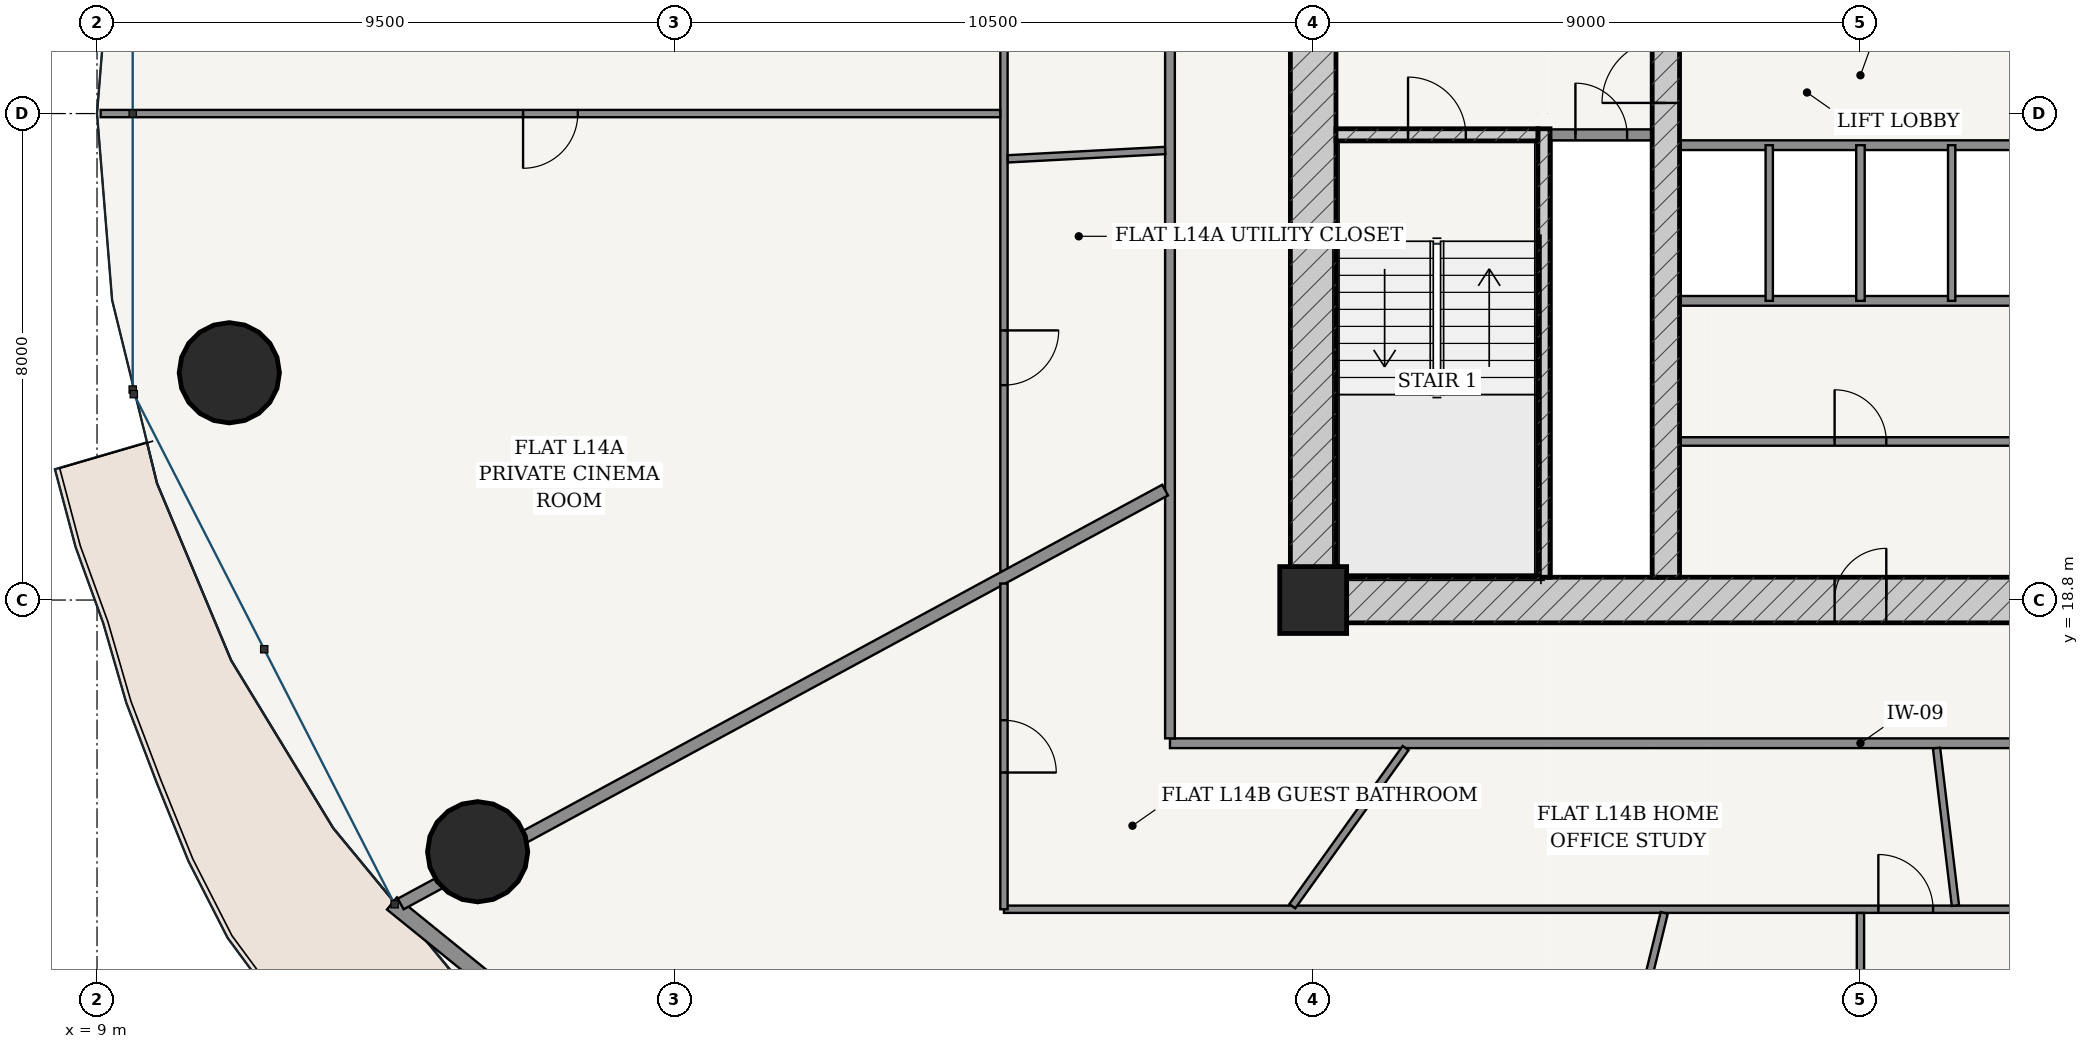
"""IFC4 building model, lengths in metres.
Left out: names, types, materials, properties, quantities, classifications, styles, units other than length and angle.
Written with IfcOpenShell. Run it as: python <this file> out.ifc"""

import sys

from ifc_helpers import new_model, si_unit, direction, frame, frame_2d, origin, origin_2d, place, context, subcontext, project, spatial, rectangle, hollow_circle, extrude, source, transform, mapped, element, fill, save


model = new_model("IFC4")
c1 = context("Model", 3, precision=1e-05, world=origin(), true_north=direction((-0.2419218956, 0.970295726276)))
c2 = subcontext(c1, "Body", "Model", "MODEL_VIEW")
j1 = project(units=[si_unit("LENGTHUNIT", "METRE"), si_unit("PLANEANGLEUNIT", "RADIAN")], contexts=[c1])
p1 = place(None, origin())
s1 = spatial("IfcSite", under=j1, at=p1, CompositionType="ELEMENT")
p2 = place(p1, origin())
s2 = spatial("IfcBuilding", under=s1, at=p2, CompositionType="ELEMENT")
p3 = place(p2, frame((0.0, 0.0, 56.4)))
s3 = spatial("IfcBuildingStorey", under=s2, at=p3, CompositionType="ELEMENT", Elevation=56.4)
p4 = place(p3, frame((29.0, 18.8, 0.0), z_axis=(0.0, 0.0, 1.0), x_axis=(1.0, 0.0, 0.0)))
e1 = element("IfcColumn", 1, at=p4, inside=s3, PredefinedType="COLUMN", context=c2, shape_type="SweptSolid", body=[
    extrude(rectangle(XDim=1.1, YDim=1.1, at=origin_2d()), origin(), (0.0, 0.0, 1.0), 3.6),
])
p5 = place(p3, frame((28.625, 18.8, 0.0), z_axis=(0.0, 0.0, 1.0), x_axis=(1.0, 0.0, 0.0)))
e2 = element("IfcWall", 2, at=p5, inside=s3, PredefinedType="SHEAR", context=c2, shape_type="SweptSolid", body=[
    extrude(rectangle(XDim=18.75, YDim=0.75, at=frame_2d((9.375, 0.0))), origin(), (0.0, 0.0, 1.0), 3.32),
])
p6 = place(p5, frame((8.95, 0.0, 0.0)))
e3 = element("IfcOpeningElement", 3, at=p6, cuts=e2, PredefinedType="OPENING", context=c2, shape_type="SweptSolid", body=[
    extrude(rectangle(XDim=0.85, YDim=2.1, at=frame_2d((0.425, 1.05))), frame((0.0, 0.385, 0.0), z_axis=(0.0, -1.0, 0.0), x_axis=(1.0, 0.0, 0.0)), (0.0, 0.0, 1.0), 0.77),
])
p7 = place(p3, frame((29.0, 19.175, 0.0), z_axis=(0.0, 0.0, 1.0), x_axis=(0.0, 1.0, 0.0)))
e4 = element("IfcWall", 4, at=p7, inside=s3, PredefinedType="SHEAR", context=c2, shape_type="SweptSolid", body=[
    extrude(rectangle(XDim=15.25, YDim=0.75, at=frame_2d((7.625, 0.0))), origin(), (0.0, 0.0, 1.0), 3.32),
])
p8 = place(p7, frame((9.875, 0.0, 0.0)))
e5 = element("IfcOpeningElement", 5, at=p8, cuts=e4, PredefinedType="OPENING", context=c2, shape_type="SweptSolid", body=[
    extrude(rectangle(XDim=1.5, YDim=2.2, at=frame_2d((0.75, 1.1))), frame((0.0, 0.385, 0.0), z_axis=(0.0, -1.0, 0.0), x_axis=(1.0, 0.0, 0.0)), (0.0, 0.0, 1.0), 0.77),
])
p9 = place(p3, frame((32.795, 19.175, 0.0), z_axis=(0.0, 0.0, 1.0), x_axis=(0.0, 1.0, 0.0)))
e6 = element("IfcWall", 6, at=p9, inside=s3, PredefinedType="SOLIDWALL", context=c2, shape_type="SweptSolid", body=[
    extrude(rectangle(XDim=7.375, YDim=0.2, at=frame_2d((3.688, 0.0))), origin(), (0.0, 0.0, 1.0), 3.32),
])
p10 = place(p3, frame((29.375, 26.45, 0.0), z_axis=(0.0, 0.0, 1.0), x_axis=(1.0, 0.0, 0.0)))
e7 = element("IfcWall", 7, at=p10, inside=s3, PredefinedType="SOLIDWALL", context=c2, shape_type="SweptSolid", body=[
    extrude(rectangle(XDim=3.32, YDim=0.2, at=frame_2d((1.66, 0.0))), origin(), (0.0, 0.0, 1.0), 3.32),
])
p11 = place(p10, frame((1.185, 0.0, 0.0)))
e8 = element("IfcOpeningElement", 8, at=p11, cuts=e7, PredefinedType="OPENING", context=c2, shape_type="SweptSolid", body=[
    extrude(rectangle(XDim=0.95, YDim=2.15, at=frame_2d((0.475, 1.075))), frame((0.0, 0.11, 0.0), z_axis=(0.0, -1.0, 0.0), x_axis=(1.0, 0.0, 0.0)), (0.0, 0.0, 1.0), 0.22),
])
p12 = place(p3, frame((34.8, 19.175, 0.0), z_axis=(0.0, 0.0, 1.0), x_axis=(0.0, 1.0, 0.0)))
e9 = element("IfcWall", 9, at=p12, inside=s3, PredefinedType="SHEAR", context=c2, shape_type="SweptSolid", body=[
    extrude(rectangle(XDim=15.25, YDim=0.45, at=frame_2d((7.625, 0.0))), origin(), (0.0, 0.0, 1.0), 3.32),
])
p13 = place(p12, frame((7.8, 0.0, 0.0)))
e10 = element("IfcOpeningElement", 10, at=p13, cuts=e9, PredefinedType="OPENING", context=c2, shape_type="SweptSolid", body=[
    extrude(rectangle(XDim=1.05, YDim=2.15, at=frame_2d((0.525, 1.075))), frame((0.0, 0.235, 0.0), z_axis=(0.0, -1.0, 0.0), x_axis=(1.0, 0.0, 0.0)), (0.0, 0.0, 1.0), 0.47),
])
for number, where, z_axis, x_axis in (
    (11, (11.176, 22.537, 0.0), (0.0, 0.0, 1.0), (1.0, 0.0, 0.0)),
    (12, (15.259, 14.661, 0.0), (0.0, 0.0, 1.0), (1.0, 0.0, 0.0)),
):
    element("IfcColumn", number, at=place(p3, frame(where, z_axis=z_axis, x_axis=x_axis)), inside=s3, PredefinedType="COLUMN", context=c2, shape_type="SweptSolid", body=[
        extrude(hollow_circle(Radius=0.825, WallThickness=0.05, at=origin_2d()), origin(), (0.0, 0.0, 1.0), 3.6),
    ])
p14 = place(p3, frame((13.85, 13.811, 0.0), z_axis=(0.0, 0.0, 1.0), x_axis=(0.777016782851, -0.629479879875, 0.0)))
e13 = element("IfcWall", 13, at=p14, inside=s3, PredefinedType="SOLIDWALL", context=c2, shape_type="SweptSolid", body=[
    extrude(rectangle(XDim=10.447, YDim=0.26, at=frame_2d((5.223, 0.0))), origin(), (0.0, 0.0, 1.0), 3.32),
])
p15 = place(p14, frame((4.548, 0.0, 0.0)))
e14 = element("IfcOpeningElement", 14, at=p15, cuts=e13, PredefinedType="OPENING", context=c2, shape_type="SweptSolid", body=[
    extrude(rectangle(XDim=1.35, YDim=2.2, at=frame_2d((0.675, 1.1))), frame((0.0, 0.14, 0.0), z_axis=(0.0, -1.0, 0.0), x_axis=(1.0, 0.0, 0.0)), (0.0, 0.0, 1.0), 0.28),
])
p16 = place(p3, frame((32.9, 26.45, 0.0), z_axis=(0.0, 0.0, 1.0), x_axis=(1.0, 0.0, 0.0)))
e15 = element("IfcWall", 15, at=p16, inside=s3, PredefinedType="PARTITIONING", context=c2, shape_type="SweptSolid", body=[
    extrude(rectangle(XDim=1.675, YDim=0.18, at=frame_2d((0.837, 0.0))), origin(), (0.0, 0.0, 1.0), 3.32),
])
p17 = place(p16, frame((0.413, 0.0, 0.0)))
e16 = element("IfcOpeningElement", 16, at=p17, cuts=e15, PredefinedType="OPENING", context=c2, shape_type="SweptSolid", body=[
    extrude(rectangle(XDim=0.85, YDim=2.1, at=frame_2d((0.425, 1.05))), frame((0.0, 0.1, 0.0), z_axis=(0.0, -1.0, 0.0), x_axis=(1.0, 0.0, 0.0)), (0.0, 0.0, 1.0), 0.2),
])
for number, where, z_axis, x_axis in (
    (17, (35.025, 26.28, 0.0), (0.0, 0.0, 1.0), (1.0, 0.0, 0.0)),
    (18, (35.025, 23.72, 0.0), (0.0, 0.0, 1.0), (1.0, 0.0, 0.0)),
):
    element("IfcWall", number, at=place(p3, frame(where, z_axis=z_axis, x_axis=x_axis)), inside=s3, PredefinedType="PARTITIONING", context=c2, shape_type="SweptSolid", body=[
        extrude(rectangle(XDim=5.95, YDim=0.16, at=frame_2d((2.975, 0.0))), origin(), (0.0, 0.0, 1.0), 3.32),
    ])
p18 = place(p3, frame((36.5, 23.72, 0.0), z_axis=(0.0, 0.0, 1.0), x_axis=(0.0, 1.0, 0.0)))
e19 = element("IfcWall", 19, at=p18, inside=s3, PredefinedType="PARTITIONING", context=c2, shape_type="SweptSolid", body=[
    extrude(rectangle(XDim=2.56, YDim=0.12, at=frame_2d((1.28, 0.0))), origin(), (0.0, 0.0, 1.0), 3.32),
])
p19 = place(p3, frame((38.0, 23.72, 0.0), z_axis=(0.0, 0.0, 1.0), x_axis=(0.0, 1.0, 0.0)))
e20 = element("IfcWall", 20, at=p19, inside=s3, PredefinedType="PARTITIONING", context=c2, shape_type="SweptSolid", body=[
    extrude(rectangle(XDim=2.56, YDim=0.14, at=frame_2d((1.28, 0.0))), origin(), (0.0, 0.0, 1.0), 3.32),
])
p20 = place(p3, frame((39.5, 23.72, 0.0), z_axis=(0.0, 0.0, 1.0), x_axis=(0.0, 1.0, 0.0)))
e21 = element("IfcWall", 21, at=p20, inside=s3, PredefinedType="PARTITIONING", context=c2, shape_type="SweptSolid", body=[
    extrude(rectangle(XDim=2.56, YDim=0.12, at=frame_2d((1.28, 0.0))), origin(), (0.0, 0.0, 1.0), 3.32),
])
p21 = place(p3, frame((35.025, 21.407, 0.0), z_axis=(0.0, 0.0, 1.0), x_axis=(1.0, 0.0, 0.0)))
e22 = element("IfcWall", 22, at=p21, inside=s3, PredefinedType="PARTITIONING", context=c2, shape_type="SweptSolid", body=[
    extrude(rectangle(XDim=5.95, YDim=0.14, at=frame_2d((2.975, 0.0))), origin(), (0.0, 0.0, 1.0), 3.32),
])
p22 = place(p21, frame((2.55, 0.0, 0.0)))
e23 = element("IfcOpeningElement", 23, at=p22, cuts=e22, PredefinedType="OPENING", context=c2, shape_type="SweptSolid", body=[
    extrude(rectangle(XDim=0.85, YDim=2.1, at=frame_2d((0.425, 1.05))), frame((0.0, 0.08, 0.0), z_axis=(0.0, -1.0, 0.0), x_axis=(1.0, 0.0, 0.0)), (0.0, 0.0, 1.0), 0.16),
])
p23 = place(p3, frame((26.645, 16.445, 0.0), z_axis=(0.0, 0.0, 1.0), x_axis=(1.0, 0.0, 0.0)))
e24 = element("IfcWall", 24, at=p23, inside=s3, PredefinedType="PARTITIONING", context=c2, shape_type="SweptSolid", body=[
    extrude(rectangle(XDim=22.71, YDim=0.16, at=frame_2d((11.355, 0.0))), origin(), (0.0, 0.0, 1.0), 2.688),
])
p24 = place(p3, frame((26.645, 16.525, 0.0), z_axis=(0.0, 0.0, 1.0), x_axis=(0.0, 1.0, 0.0)))
e25 = element("IfcWall", 25, at=p24, inside=s3, PredefinedType="PARTITIONING", context=c2, shape_type="SweptSolid", body=[
    extrude(rectangle(XDim=20.55, YDim=0.16, at=frame_2d((10.275, 0.0))), origin(), (0.0, 0.0, 1.0), 2.688),
])
p25 = place(p24, frame((16.837, 0.0, 0.0)))
e26 = element("IfcOpeningElement", 26, at=p25, cuts=e25, PredefinedType="OPENING", context=c2, shape_type="SweptSolid", body=[
    extrude(rectangle(XDim=0.98, YDim=2.2, at=frame_2d((0.49, 1.1))), frame((0.0, 0.09, 0.0), z_axis=(0.0, -1.0, 0.0), x_axis=(1.0, 0.0, 0.0)), (0.0, 0.0, 1.0), 0.18),
])
p26 = place(p3, frame((23.915, 19.276, 0.0), z_axis=(0.0, 0.0, 1.0), x_axis=(0.0, 1.0, 0.0)))
e27 = element("IfcWall", 27, at=p26, inside=s3, PredefinedType="PARTITIONING", context=c2, shape_type="SweptSolid", body=[
    extrude(rectangle(XDim=20.609, YDim=0.12, at=frame_2d((10.305, 0.0))), origin(), (0.0, 0.0, 1.0), 2.688),
])
p27 = place(p26, frame((15.972, 0.0, 0.0)))
e28 = element("IfcOpeningElement", 28, at=p27, cuts=e27, PredefinedType="OPENING", context=c2, shape_type="SweptSolid", body=[
    extrude(rectangle(XDim=0.9, YDim=2.15, at=frame_2d((0.45, 1.075))), frame((0.0, 0.07, 0.0), z_axis=(0.0, -1.0, 0.0), x_axis=(1.0, 0.0, 0.0)), (0.0, 0.0, 1.0), 0.14),
])
p28 = place(p26, frame((3.058, 0.0, 0.0)))
e29 = element("IfcOpeningElement", 29, at=p28, cuts=e27, PredefinedType="OPENING", context=c2, shape_type="SweptSolid", body=[
    extrude(rectangle(XDim=0.9, YDim=2.15, at=frame_2d((0.45, 1.075))), frame((0.0, 0.07, 0.0), z_axis=(0.0, -1.0, 0.0), x_axis=(1.0, 0.0, 0.0)), (0.0, 0.0, 1.0), 0.14),
])
p29 = place(p3, frame((23.853, 26.8, 0.0), z_axis=(0.0, 0.0, 1.0), x_axis=(-1.0, 0.0, 0.0)))
e30 = element("IfcWall", 30, at=p29, inside=s3, PredefinedType="PARTITIONING", context=c2, shape_type="SweptSolid", body=[
    extrude(rectangle(XDim=14.793, YDim=0.12, at=frame_2d((7.396, 0.0))), origin(), (0.0, 0.0, 1.0), 2.762),
])
p30 = place(p29, frame((6.947, 0.0, 0.0)))
e31 = element("IfcOpeningElement", 31, at=p30, cuts=e30, PredefinedType="OPENING", context=c2, shape_type="SweptSolid", body=[
    extrude(rectangle(XDim=0.9, YDim=2.15, at=frame_2d((0.45, 1.075))), frame((0.0, 0.07, 0.0), z_axis=(0.0, -1.0, 0.0), x_axis=(1.0, 0.0, 0.0)), (0.0, 0.0, 1.0), 0.14),
])
p31 = place(p3, frame((26.565, 26.193, 0.0), z_axis=(0.0, 0.0, 1.0), x_axis=(-0.99859273586, -0.053033460078, 0.0)))
e32 = element("IfcWall", 32, at=p31, inside=s3, PredefinedType="PARTITIONING", context=c2, shape_type="SweptSolid", body=[
    extrude(rectangle(XDim=2.592, YDim=0.12, at=frame_2d((1.296, 0.0))), origin(), (0.0, 0.0, 1.0), 3.32),
])
p32 = place(p3, frame((26.565, 20.608, 0.0), z_axis=(0.0, 0.0, 1.0), x_axis=(-0.879369737803, -0.476139542819, 0.0)))
e33 = element("IfcWall", 33, at=p32, inside=s3, PredefinedType="PARTITIONING", context=c2, shape_type="SweptSolid", body=[
    extrude(rectangle(XDim=14.295, YDim=0.2, at=frame_2d((7.147, 0.0))), origin(), (0.0, 0.0, 1.0), 2.688),
])
p33 = place(p3, frame((52.085, 13.715, 0.0), z_axis=(0.0, 0.0, 1.0), x_axis=(-1.0, 0.0, 0.0)))
e34 = element("IfcWall", 34, at=p33, inside=s3, PredefinedType="PARTITIONING", context=c2, shape_type="SweptSolid", body=[
    extrude(rectangle(XDim=28.17, YDim=0.12, at=frame_2d((14.085, 0.0))), origin(), (0.0, 0.0, 1.0), 2.688),
])
p34 = place(p33, frame((12.891, 0.0, 0.0)))
e35 = element("IfcOpeningElement", 35, at=p34, cuts=e34, PredefinedType="OPENING", context=c2, shape_type="SweptSolid", body=[
    extrude(rectangle(XDim=0.9, YDim=2.15, at=frame_2d((0.45, 1.075))), frame((0.0, 0.07, 0.0), z_axis=(0.0, -1.0, 0.0), x_axis=(1.0, 0.0, 0.0)), (0.0, 0.0, 1.0), 0.14),
])
p35 = place(p3, frame((23.915, 13.715, 0.0), z_axis=(0.0, 0.0, 1.0), x_axis=(0.0, 1.0, 0.0)))
e36 = element("IfcWall", 36, at=p35, inside=s3, PredefinedType="PARTITIONING", context=c2, shape_type="SweptSolid", body=[
    extrude(rectangle(XDim=5.356, YDim=0.12, at=frame_2d((2.678, 0.0))), origin(), (0.0, 0.0, 1.0), 2.999),
])
p36 = place(p35, frame((2.248, 0.0, 0.0)))
e37 = element("IfcOpeningElement", 37, at=p36, cuts=e36, PredefinedType="OPENING", context=c2, shape_type="SweptSolid", body=[
    extrude(rectangle(XDim=0.86, YDim=2.15, at=frame_2d((0.43, 1.075))), frame((0.0, 0.07, 0.0), z_axis=(0.0, -1.0, 0.0), x_axis=(1.0, 0.0, 0.0)), (0.0, 0.0, 1.0), 0.14),
])
p37 = place(p3, frame((34.773, 13.655, 0.0), z_axis=(0.0, 0.0, 1.0), x_axis=(-0.238375747469, -0.97117300365, 0.0)))
e38 = element("IfcWall", 38, at=p37, inside=s3, PredefinedType="PARTITIONING", context=c2, shape_type="SweptSolid", body=[
    extrude(rectangle(XDim=10.086, YDim=0.12, at=frame_2d((5.043, 0.0))), origin(), (0.0, 0.0, 1.0), 2.688),
])
p38 = place(p37, frame((3.518, 0.0, 0.0)))
e39 = element("IfcOpeningElement", 39, at=p38, cuts=e38, PredefinedType="OPENING", context=c2, shape_type="SweptSolid", body=[
    extrude(rectangle(XDim=0.9, YDim=2.15, at=frame_2d((0.45, 1.075))), frame((0.0, 0.07, 0.0), z_axis=(0.0, -1.0, 0.0), x_axis=(1.0, 0.0, 0.0)), (0.0, 0.0, 1.0), 0.14),
])
p39 = place(p3, frame((38.0, 13.653, 0.0), z_axis=(0.0, 0.0, 1.0), x_axis=(0.0, -1.0, 0.0)))
e40 = element("IfcWall", 40, at=p39, inside=s3, PredefinedType="PARTITIONING", context=c2, shape_type="SweptSolid", body=[
    extrude(rectangle(XDim=10.293, YDim=0.12, at=frame_2d((5.146, 0.0))), origin(), (0.0, 0.0, 1.0), 2.762),
])
p40 = place(p39, frame((4.697, 0.0, 0.0)))
e41 = element("IfcOpeningElement", 41, at=p40, cuts=e40, PredefinedType="OPENING", context=c2, shape_type="SweptSolid", body=[
    extrude(rectangle(XDim=0.9, YDim=2.15, at=frame_2d((0.45, 1.075))), frame((0.0, 0.07, 0.0), z_axis=(0.0, -1.0, 0.0), x_axis=(1.0, 0.0, 0.0)), (0.0, 0.0, 1.0), 0.14),
])
p41 = place(p3, frame((30.52, 16.365, 0.0), z_axis=(0.0, 0.0, 1.0), x_axis=(-0.582566008831, -0.812783393872, 0.0)))
e42 = element("IfcWall", 42, at=p41, inside=s3, PredefinedType="PARTITIONING", context=c2, shape_type="SweptSolid", body=[
    extrude(rectangle(XDim=3.198, YDim=0.12, at=frame_2d((1.599, 0.0))), origin(), (0.0, 0.0, 1.0), 3.32),
])
p42 = place(p3, frame((39.251, 16.365, 0.0), z_axis=(0.0, 0.0, 1.0), x_axis=(0.1191230636, -0.992879497078, 0.0)))
e43 = element("IfcWall", 43, at=p42, inside=s3, PredefinedType="PARTITIONING", context=c2, shape_type="SweptSolid", body=[
    extrude(rectangle(XDim=2.607, YDim=0.12, at=frame_2d((1.303, 0.0))), origin(), (0.0, 0.0, 1.0), 3.32),
])
m1 = source(origin(), c2, "Body", "SweptSolid", [
    extrude(rectangle(XDim=1.05, YDim=2.15, at=frame_2d((0.525, 1.075))), frame((0.0, 0.025, 0.0), z_axis=(0.0, -1.0, 0.0), x_axis=(1.0, 0.0, 0.0)), (0.0, 0.0, 1.0), 0.05),
])
p43 = place(p13, origin())
e44 = element("IfcDoor", 44, at=p43, inside=s3, OperationType="SINGLE_SWING_LEFT", PredefinedType="DOOR", context=c2, shape_type="MappedRepresentation", body=[
    mapped(m1, transform((0.0, 0.0, 0.0), scale=1.0)),
])
fill(e10, e44)
m2 = source(origin(), c2, "Body", "SweptSolid", [
    extrude(rectangle(XDim=0.95, YDim=2.15, at=frame_2d((0.475, 1.075))), frame((0.0, 0.025, 0.0), z_axis=(0.0, -1.0, 0.0), x_axis=(1.0, 0.0, 0.0)), (0.0, 0.0, 1.0), 0.05),
])
p44 = place(p11, origin())
e45 = element("IfcDoor", 45, at=p44, inside=s3, OperationType="SINGLE_SWING_LEFT", PredefinedType="DOOR", context=c2, shape_type="MappedRepresentation", body=[
    mapped(m2, transform((0.0, 0.0, 0.0), scale=1.0)),
])
fill(e8, e45)
m3 = source(origin(), c2, "Body", "SweptSolid", [
    extrude(rectangle(XDim=0.85, YDim=2.1, at=frame_2d((0.425, 1.05))), frame((0.0, 0.025, 0.0), z_axis=(0.0, -1.0, 0.0), x_axis=(1.0, 0.0, 0.0)), (0.0, 0.0, 1.0), 0.05),
])
p45 = place(p17, origin())
e46 = element("IfcDoor", 46, at=p45, inside=s3, OperationType="SINGLE_SWING_LEFT", PredefinedType="DOOR", context=c2, shape_type="MappedRepresentation", body=[
    mapped(m3, transform((0.0, 0.0, 0.0), scale=1.0)),
])
fill(e16, e46)
p46 = place(p6, origin())
e47 = element("IfcDoor", 47, at=p46, inside=s3, OperationType="SINGLE_SWING_RIGHT", PredefinedType="DOOR", context=c2, shape_type="MappedRepresentation", body=[
    mapped(m3, transform((0.0, 0.0, 0.0), scale=1.0)),
])
fill(e3, e47)
p47 = place(p22, origin())
e48 = element("IfcDoor", 48, at=p47, inside=s3, OperationType="SINGLE_SWING_LEFT", PredefinedType="DOOR", context=c2, shape_type="MappedRepresentation", body=[
    mapped(m3, transform((0.0, 0.0, 0.0), scale=1.0)),
])
fill(e23, e48)
m4 = source(origin(), c2, "Body", "SweptSolid", [
    extrude(rectangle(XDim=0.9, YDim=2.15, at=frame_2d((0.45, 1.075))), frame((0.0, 0.025, 0.0), z_axis=(0.0, -1.0, 0.0), x_axis=(1.0, 0.0, 0.0)), (0.0, 0.0, 1.0), 0.05),
])
p48 = place(p30, origin())
e49 = element("IfcDoor", 49, at=p48, inside=s3, OperationType="SINGLE_SWING_RIGHT", PredefinedType="DOOR", context=c2, shape_type="MappedRepresentation", body=[
    mapped(m4, transform((0.0, 0.0, 0.0), scale=1.0)),
])
fill(e31, e49)
p49 = place(p28, frame((0.9, 0.0, 0.0), z_axis=(0.0, 0.0, 1.0), x_axis=(-1.0, 0.0, 0.0)))
e50 = element("IfcDoor", 50, at=p49, inside=s3, OperationType="SINGLE_SWING_LEFT", PredefinedType="DOOR", context=c2, shape_type="MappedRepresentation", body=[
    mapped(m4, transform((0.0, 0.0, 0.0), scale=1.0)),
])
fill(e29, e50)
p50 = place(p34, frame((0.9, 0.0, 0.0), z_axis=(0.0, 0.0, 1.0), x_axis=(-1.0, 0.0, 0.0)))
e51 = element("IfcDoor", 51, at=p50, inside=s3, OperationType="SINGLE_SWING_LEFT", PredefinedType="DOOR", context=c2, shape_type="MappedRepresentation", body=[
    mapped(m4, transform((0.0, 0.0, 0.0), scale=1.0)),
])
fill(e35, e51)
m5 = source(origin(), c2, "Body", "SweptSolid", [
    extrude(rectangle(XDim=0.86, YDim=2.15, at=frame_2d((0.43, 1.075))), frame((0.0, 0.025, 0.0), z_axis=(0.0, -1.0, 0.0), x_axis=(1.0, 0.0, 0.0)), (0.0, 0.0, 1.0), 0.05),
])
p51 = place(p36, frame((0.86, 0.0, 0.0), z_axis=(0.0, 0.0, 1.0), x_axis=(-1.0, 0.0, 0.0)))
e52 = element("IfcDoor", 52, at=p51, inside=s3, OperationType="SINGLE_SWING_RIGHT", PredefinedType="DOOR", context=c2, shape_type="MappedRepresentation", body=[
    mapped(m5, transform((0.0, 0.0, 0.0), scale=1.0)),
])
fill(e37, e52)
save(model, sys.argv[1])
